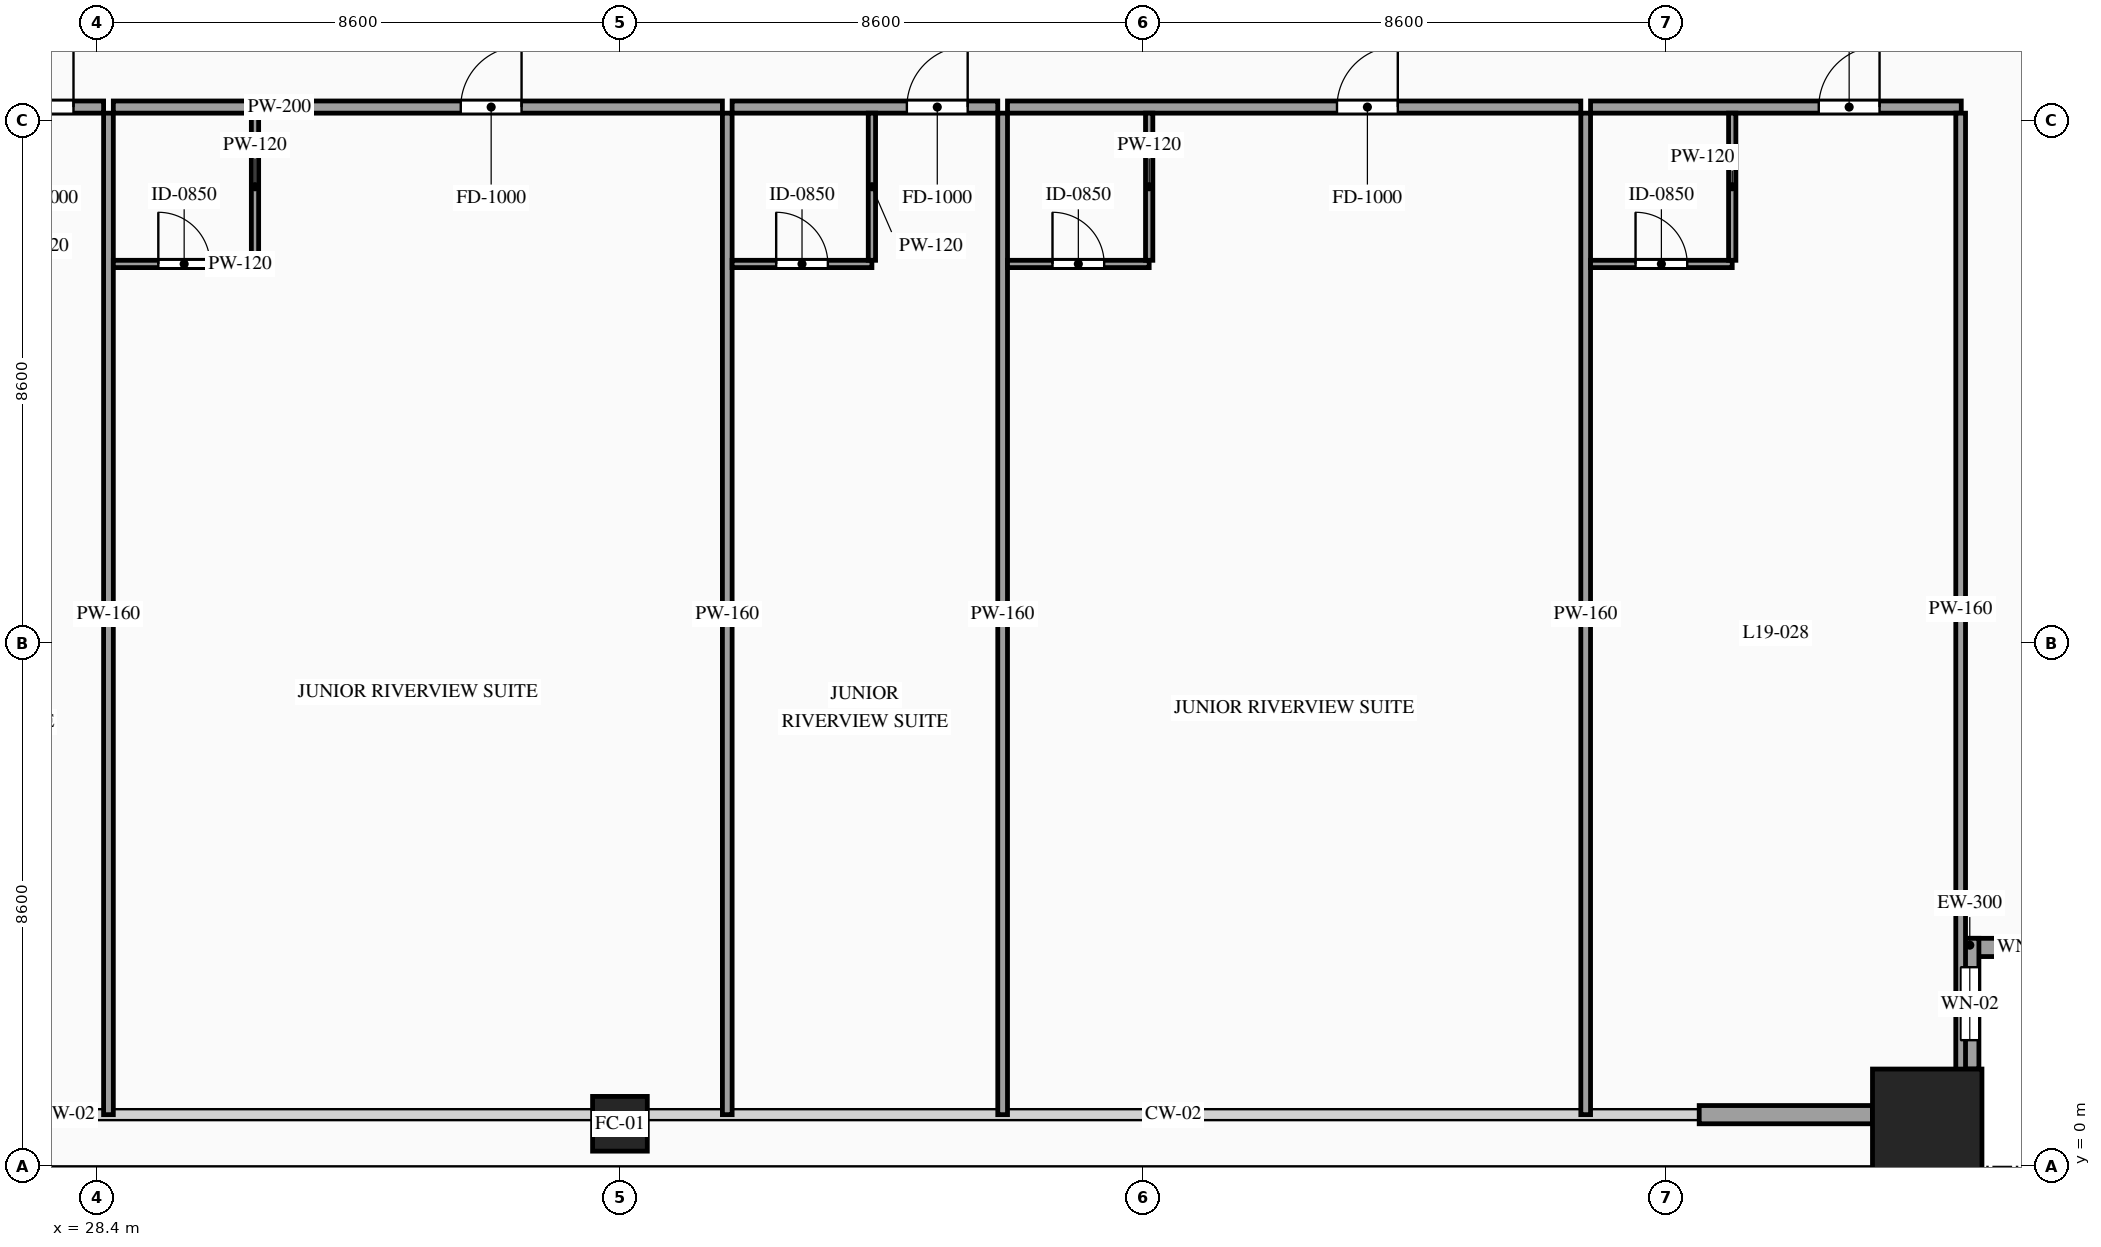
"""IFC4 building model, lengths in metres.
Left out: names, types, materials, properties, quantities, classifications, styles, units other than length and angle.
Written with IfcOpenShell. Run it as: python <this file> out.ifc"""

import sys

from ifc_helpers import new_model, si_unit, direction, frame, frame_2d, origin, origin_2d, place, context, subcontext, project, spatial, rectangle, hollow_rectangle, extrude, source, transform, mapped, element, fill, save


model = new_model("IFC4")
c1 = context("Model", 3, precision=1e-05, world=origin(), true_north=direction((0.0, 1.0)))
c2 = subcontext(c1, "Body", "Model", "MODEL_VIEW")
j1 = project(units=[si_unit("LENGTHUNIT", "METRE"), si_unit("PLANEANGLEUNIT", "RADIAN")], contexts=[c1])
p1 = place(None, origin())
s1 = spatial("IfcSite", under=j1, at=p1, CompositionType="ELEMENT")
p2 = place(p1, origin())
s2 = spatial("IfcBuilding", under=s1, at=p2, CompositionType="ELEMENT")
p3 = place(p2, frame((0.0, 0.0, 74.8)))
s3 = spatial("IfcBuildingStorey", under=s2, at=p3, CompositionType="ELEMENT", Elevation=74.8)
m1 = source(origin(), c2, "Body", "SweptSolid", [
    extrude(hollow_rectangle(XDim=0.9, YDim=0.9, WallThickness=0.042, at=origin_2d()), origin(), (0.0, 0.0, 1.0), 3.6),
])
p4 = place(p3, frame((37.0, 0.7, 0.0), z_axis=(0.0, 0.0, 1.0), x_axis=(1.0, 0.0, 0.0)))
e1 = element("IfcColumn", 1, at=p4, inside=s3, PredefinedType="COLUMN", context=c2, shape_type="MappedRepresentation", body=[
    mapped(m1, transform((0.0, 0.0, 0.0), scale=1.0)),
])
m2 = source(origin(), c2, "Body", "SweptSolid", [
    extrude(hollow_rectangle(XDim=1.8, YDim=1.8, WallThickness=0.08, at=origin_2d()), origin(), (0.0, 0.0, 1.0), 3.6),
])
p5 = place(p3, frame((58.5, 0.7, 0.0), z_axis=(0.0, 0.0, 1.0), x_axis=(1.0, 0.0, 0.0)))
e2 = element("IfcColumn", 2, at=p5, inside=s3, PredefinedType="COLUMN", context=c2, shape_type="MappedRepresentation", body=[
    mapped(m2, transform((0.0, 0.0, 0.0), scale=1.0)),
])
p6 = place(p3, frame((59.05, 3.6, 0.0), z_axis=(0.0, 0.0, 1.0), x_axis=(1.0, 0.0, 0.0)))
e3 = element("IfcWall", 3, at=p6, inside=s3, PredefinedType="SOLIDWALL", context=c2, shape_type="SweptSolid", body=[
    extrude(rectangle(XDim=2.15, YDim=0.3, at=frame_2d((1.075, 0.0))), origin(), (0.0, 0.0, 1.0), 3.38),
])
p7 = place(p6, frame((0.625, 0.0, 0.85)))
e4 = element("IfcOpeningElement", 4, at=p7, cuts=e3, PredefinedType="OPENING", context=c2, shape_type="SweptSolid", body=[
    extrude(rectangle(XDim=0.9, YDim=1.5, at=frame_2d((0.45, 0.75))), frame((0.0, 0.165, 0.0), z_axis=(0.0, -1.0, 0.0), x_axis=(1.0, 0.0, 0.0)), (0.0, 0.0, 1.0), 0.33),
])
p8 = place(p3, frame((59.2, 1.6, 0.0), z_axis=(0.0, 0.0, 1.0), x_axis=(0.0, 1.0, 0.0)))
e5 = element("IfcWall", 5, at=p8, inside=s3, PredefinedType="SOLIDWALL", context=c2, shape_type="SweptSolid", body=[
    extrude(rectangle(XDim=2.15, YDim=0.3, at=frame_2d((1.075, 0.0))), origin(), (0.0, 0.0, 1.0), 3.38),
])
p9 = place(p8, frame((0.475, 0.0, 0.85)))
e6 = element("IfcOpeningElement", 6, at=p9, cuts=e5, PredefinedType="OPENING", context=c2, shape_type="SweptSolid", body=[
    extrude(rectangle(XDim=1.2, YDim=2.1, at=frame_2d((0.6, 1.05))), frame((0.0, 0.165, 0.0), z_axis=(0.0, -1.0, 0.0), x_axis=(1.0, 0.0, 0.0)), (0.0, 0.0, 1.0), 0.33),
])
m3 = source(origin(), c2, "Body", "SweptSolid", [
    extrude(rectangle(XDim=2.85, YDim=0.3, at=frame_2d((1.425, 0.0))), origin(), (0.0, 0.0, 1.0), 2.775),
])
p10 = place(p3, frame((54.75, 0.85, 0.0), z_axis=(0.0, 0.0, 1.0), x_axis=(1.0, 0.0, 0.0)))
e7 = element("IfcWall", 7, at=p10, inside=s3, PredefinedType="SOLIDWALL", context=c2, shape_type="MappedRepresentation", body=[
    mapped(m3, transform((0.0, 0.0, 0.0), scale=1.0)),
])
p11 = place(p3, frame((24.138, 17.42, 0.0), z_axis=(0.0, 0.0, 1.0), x_axis=(1.0, 0.0, 0.0)))
e8 = element("IfcWall", 8, at=p11, inside=s3, PredefinedType="PARTITIONING", context=c2, shape_type="SweptSolid", body=[
    extrude(rectangle(XDim=4.37, YDim=0.2, at=frame_2d((2.185, 0.0))), origin(), (0.0, 0.0, 1.0), 3.38),
])
p12 = place(p11, frame((2.875, 0.0, 0.0)))
e9 = element("IfcOpeningElement", 9, at=p12, cuts=e8, PredefinedType="OPENING", context=c2, shape_type="SweptSolid", body=[
    extrude(rectangle(XDim=1.0, YDim=2.2, at=frame_2d((0.5, 1.1))), frame((0.0, 0.115, 0.0), z_axis=(0.0, -1.0, 0.0), x_axis=(1.0, 0.0, 0.0)), (0.0, 0.0, 1.0), 0.23),
])
m4 = source(origin(), c2, "Body", "SweptSolid", [
    extrude(rectangle(XDim=16.47, YDim=0.16, at=frame_2d((8.235, 0.0))), origin(), (0.0, 0.0, 1.0), 3.38),
])
p13 = place(p3, frame((28.588, 0.85, 0.0), z_axis=(0.0, 0.0, 1.0), x_axis=(0.0, 1.0, 0.0)))
e10 = element("IfcWall", 10, at=p13, inside=s3, PredefinedType="PARTITIONING", context=c2, shape_type="MappedRepresentation", body=[
    mapped(m4, transform((0.0, 0.0, 0.0), scale=1.0)),
])
p14 = place(p3, frame((28.668, 17.42, 0.0), z_axis=(0.0, 0.0, 1.0), x_axis=(1.0, 0.0, 0.0)))
e11 = element("IfcWall", 11, at=p14, inside=s3, PredefinedType="PARTITIONING", context=c2, shape_type="SweptSolid", body=[
    extrude(rectangle(XDim=10.017, YDim=0.2, at=frame_2d((5.009, 0.0))), origin(), (0.0, 0.0, 1.0), 3.38),
])
p15 = place(p14, frame((5.714, 0.0, 0.0)))
e12 = element("IfcOpeningElement", 12, at=p15, cuts=e11, PredefinedType="OPENING", context=c2, shape_type="SweptSolid", body=[
    extrude(rectangle(XDim=1.0, YDim=2.2, at=frame_2d((0.5, 1.1))), frame((0.0, 0.115, 0.0), z_axis=(0.0, -1.0, 0.0), x_axis=(1.0, 0.0, 0.0)), (0.0, 0.0, 1.0), 0.23),
])
p16 = place(p3, frame((38.765, 0.85, 0.0), z_axis=(0.0, 0.0, 1.0), x_axis=(0.0, 1.0, 0.0)))
e13 = element("IfcWall", 13, at=p16, inside=s3, PredefinedType="PARTITIONING", context=c2, shape_type="MappedRepresentation", body=[
    mapped(m4, transform((0.0, 0.0, 0.0), scale=1.0)),
])
p17 = place(p3, frame((28.668, 14.84, 0.0), z_axis=(0.0, 0.0, 1.0), x_axis=(1.0, 0.0, 0.0)))
e14 = element("IfcWall", 14, at=p17, inside=s3, PredefinedType="PARTITIONING", context=c2, shape_type="SweptSolid", body=[
    extrude(rectangle(XDim=2.33, YDim=0.12, at=frame_2d((1.165, 0.0))), origin(), (0.0, 0.0, 1.0), 3.38),
])
p18 = place(p17, frame((0.74, 0.0, 0.0)))
e15 = element("IfcOpeningElement", 15, at=p18, cuts=e14, PredefinedType="OPENING", context=c2, shape_type="SweptSolid", body=[
    extrude(rectangle(XDim=0.85, YDim=2.1, at=frame_2d((0.425, 1.05))), frame((0.0, 0.075, 0.0), z_axis=(0.0, -1.0, 0.0), x_axis=(1.0, 0.0, 0.0)), (0.0, 0.0, 1.0), 0.15),
])
m5 = source(origin(), c2, "Body", "SweptSolid", [
    extrude(rectangle(XDim=2.42, YDim=0.12, at=frame_2d((1.21, 0.0))), origin(), (0.0, 0.0, 1.0), 3.38),
])
p19 = place(p3, frame((30.998, 14.9, 0.0), z_axis=(0.0, 0.0, 1.0), x_axis=(0.0, 1.0, 0.0)))
e16 = element("IfcWall", 16, at=p19, inside=s3, PredefinedType="PARTITIONING", context=c2, shape_type="MappedRepresentation", body=[
    mapped(m5, transform((0.0, 0.0, 0.0), scale=1.0)),
])
p20 = place(p3, frame((38.845, 17.42, 0.0), z_axis=(0.0, 0.0, 1.0), x_axis=(1.0, 0.0, 0.0)))
e17 = element("IfcWall", 17, at=p20, inside=s3, PredefinedType="PARTITIONING", context=c2, shape_type="SweptSolid", body=[
    extrude(rectangle(XDim=4.369, YDim=0.2, at=frame_2d((2.185, 0.0))), origin(), (0.0, 0.0, 1.0), 3.38),
])
p21 = place(p20, frame((2.874, 0.0, 0.0)))
e18 = element("IfcOpeningElement", 18, at=p21, cuts=e17, PredefinedType="OPENING", context=c2, shape_type="SweptSolid", body=[
    extrude(rectangle(XDim=1.0, YDim=2.2, at=frame_2d((0.5, 1.1))), frame((0.0, 0.115, 0.0), z_axis=(0.0, -1.0, 0.0), x_axis=(1.0, 0.0, 0.0)), (0.0, 0.0, 1.0), 0.23),
])
p22 = place(p3, frame((43.294, 0.85, 0.0), z_axis=(0.0, 0.0, 1.0), x_axis=(0.0, 1.0, 0.0)))
e19 = element("IfcWall", 19, at=p22, inside=s3, PredefinedType="PARTITIONING", context=c2, shape_type="MappedRepresentation", body=[
    mapped(m4, transform((0.0, 0.0, 0.0), scale=1.0)),
])
p23 = place(p3, frame((38.845, 14.84, 0.0), z_axis=(0.0, 0.0, 1.0), x_axis=(1.0, 0.0, 0.0)))
e20 = element("IfcWall", 20, at=p23, inside=s3, PredefinedType="PARTITIONING", context=c2, shape_type="SweptSolid", body=[
    extrude(rectangle(XDim=2.299, YDim=0.12, at=frame_2d((1.149, 0.0))), origin(), (0.0, 0.0, 1.0), 3.38),
])
p24 = place(p23, frame((0.725, 0.0, 0.0)))
e21 = element("IfcOpeningElement", 21, at=p24, cuts=e20, PredefinedType="OPENING", context=c2, shape_type="SweptSolid", body=[
    extrude(rectangle(XDim=0.85, YDim=2.1, at=frame_2d((0.425, 1.05))), frame((0.0, 0.075, 0.0), z_axis=(0.0, -1.0, 0.0), x_axis=(1.0, 0.0, 0.0)), (0.0, 0.0, 1.0), 0.15),
])
p25 = place(p3, frame((41.144, 14.9, 0.0), z_axis=(0.0, 0.0, 1.0), x_axis=(0.0, 1.0, 0.0)))
e22 = element("IfcWall", 22, at=p25, inside=s3, PredefinedType="PARTITIONING", context=c2, shape_type="MappedRepresentation", body=[
    mapped(m5, transform((0.0, 0.0, 0.0), scale=1.0)),
])
p26 = place(p3, frame((43.374, 17.42, 0.0), z_axis=(0.0, 0.0, 1.0), x_axis=(1.0, 0.0, 0.0)))
e23 = element("IfcWall", 23, at=p26, inside=s3, PredefinedType="PARTITIONING", context=c2, shape_type="SweptSolid", body=[
    extrude(rectangle(XDim=9.429, YDim=0.2, at=frame_2d((4.714, 0.0))), origin(), (0.0, 0.0, 1.0), 3.38),
])
p27 = place(p26, frame((5.419, 0.0, 0.0)))
e24 = element("IfcOpeningElement", 24, at=p27, cuts=e23, PredefinedType="OPENING", context=c2, shape_type="SweptSolid", body=[
    extrude(rectangle(XDim=1.0, YDim=2.2, at=frame_2d((0.5, 1.1))), frame((0.0, 0.115, 0.0), z_axis=(0.0, -1.0, 0.0), x_axis=(1.0, 0.0, 0.0)), (0.0, 0.0, 1.0), 0.23),
])
p28 = place(p3, frame((52.883, 0.85, 0.0), z_axis=(0.0, 0.0, 1.0), x_axis=(0.0, 1.0, 0.0)))
e25 = element("IfcWall", 25, at=p28, inside=s3, PredefinedType="PARTITIONING", context=c2, shape_type="MappedRepresentation", body=[
    mapped(m4, transform((0.0, 0.0, 0.0), scale=1.0)),
])
p29 = place(p3, frame((43.374, 14.84, 0.0), z_axis=(0.0, 0.0, 1.0), x_axis=(1.0, 0.0, 0.0)))
e26 = element("IfcWall", 26, at=p29, inside=s3, PredefinedType="PARTITIONING", context=c2, shape_type="SweptSolid", body=[
    extrude(rectangle(XDim=2.33, YDim=0.12, at=frame_2d((1.165, 0.0))), origin(), (0.0, 0.0, 1.0), 3.38),
])
p30 = place(p29, frame((0.74, 0.0, 0.0)))
e27 = element("IfcOpeningElement", 27, at=p30, cuts=e26, PredefinedType="OPENING", context=c2, shape_type="SweptSolid", body=[
    extrude(rectangle(XDim=0.85, YDim=2.1, at=frame_2d((0.425, 1.05))), frame((0.0, 0.075, 0.0), z_axis=(0.0, -1.0, 0.0), x_axis=(1.0, 0.0, 0.0)), (0.0, 0.0, 1.0), 0.15),
])
p31 = place(p3, frame((45.704, 14.9, 0.0), z_axis=(0.0, 0.0, 1.0), x_axis=(0.0, 1.0, 0.0)))
e28 = element("IfcWall", 28, at=p31, inside=s3, PredefinedType="PARTITIONING", context=c2, shape_type="MappedRepresentation", body=[
    mapped(m5, transform((0.0, 0.0, 0.0), scale=1.0)),
])
p32 = place(p3, frame((52.963, 17.42, 0.0), z_axis=(0.0, 0.0, 1.0), x_axis=(1.0, 0.0, 0.0)))
e29 = element("IfcWall", 29, at=p32, inside=s3, PredefinedType="PARTITIONING", context=c2, shape_type="SweptSolid", body=[
    extrude(rectangle(XDim=6.097, YDim=0.2, at=frame_2d((3.049, 0.0))), origin(), (0.0, 0.0, 1.0), 3.38),
])
p33 = place(p32, frame((3.753, 0.0, 0.0)))
e30 = element("IfcOpeningElement", 30, at=p33, cuts=e29, PredefinedType="OPENING", context=c2, shape_type="SweptSolid", body=[
    extrude(rectangle(XDim=1.0, YDim=2.2, at=frame_2d((0.5, 1.1))), frame((0.0, 0.115, 0.0), z_axis=(0.0, -1.0, 0.0), x_axis=(1.0, 0.0, 0.0)), (0.0, 0.0, 1.0), 0.23),
])
m6 = source(origin(), c2, "Body", "SweptSolid", [
    extrude(rectangle(XDim=16.32, YDim=0.16, at=frame_2d((8.16, 0.0))), origin(), (0.0, 0.0, 1.0), 3.38),
])
p34 = place(p3, frame((59.05, 1.0, 0.0), z_axis=(0.0, 0.0, 1.0), x_axis=(0.0, 1.0, 0.0)))
e31 = element("IfcWall", 31, at=p34, inside=s3, PredefinedType="PARTITIONING", context=c2, shape_type="MappedRepresentation", body=[
    mapped(m6, transform((0.0, 0.0, 0.0), scale=1.0)),
])
p35 = place(p3, frame((52.963, 14.84, 0.0), z_axis=(0.0, 0.0, 1.0), x_axis=(1.0, 0.0, 0.0)))
e32 = element("IfcWall", 32, at=p35, inside=s3, PredefinedType="PARTITIONING", context=c2, shape_type="SweptSolid", body=[
    extrude(rectangle(XDim=2.33, YDim=0.12, at=frame_2d((1.165, 0.0))), origin(), (0.0, 0.0, 1.0), 3.38),
])
p36 = place(p35, frame((0.74, 0.0, 0.0)))
e33 = element("IfcOpeningElement", 33, at=p36, cuts=e32, PredefinedType="OPENING", context=c2, shape_type="SweptSolid", body=[
    extrude(rectangle(XDim=0.85, YDim=2.1, at=frame_2d((0.425, 1.05))), frame((0.0, 0.075, 0.0), z_axis=(0.0, -1.0, 0.0), x_axis=(1.0, 0.0, 0.0)), (0.0, 0.0, 1.0), 0.15),
])
p37 = place(p3, frame((55.293, 14.9, 0.0), z_axis=(0.0, 0.0, 1.0), x_axis=(0.0, 1.0, 0.0)))
e34 = element("IfcWall", 34, at=p37, inside=s3, PredefinedType="PARTITIONING", context=c2, shape_type="MappedRepresentation", body=[
    mapped(m5, transform((0.0, 0.0, 0.0), scale=1.0)),
])
m7 = source(origin(), c2, "Body", "SweptSolid", [
    extrude(rectangle(XDim=0.9, YDim=1.5, at=frame_2d((0.45, 0.75))), frame((0.0, 0.03, 0.0), z_axis=(0.0, -1.0, 0.0), x_axis=(1.0, 0.0, 0.0)), (0.0, 0.0, 1.0), 0.06),
])
p38 = place(p7, origin())
e35 = element("IfcWindow", 35, at=p38, inside=s3, PartitioningType="SINGLE_PANEL", PredefinedType="WINDOW", context=c2, shape_type="MappedRepresentation", body=[
    mapped(m7, transform((0.0, 0.0, 0.0), scale=1.0)),
])
fill(e4, e35)
m8 = source(origin(), c2, "Body", "SweptSolid", [
    extrude(rectangle(XDim=1.2, YDim=2.1, at=frame_2d((0.6, 1.05))), frame((0.0, 0.03, 0.0), z_axis=(0.0, -1.0, 0.0), x_axis=(1.0, 0.0, 0.0)), (0.0, 0.0, 1.0), 0.06),
])
p39 = place(p9, origin())
e36 = element("IfcWindow", 36, at=p39, inside=s3, PartitioningType="SINGLE_PANEL", PredefinedType="WINDOW", context=c2, shape_type="MappedRepresentation", body=[
    mapped(m8, transform((0.0, 0.0, 0.0), scale=1.0)),
])
fill(e6, e36)
m9 = source(origin(), c2, "Body", "SweptSolid", [
    extrude(rectangle(XDim=1.0, YDim=2.2, at=frame_2d((0.5, 1.1))), frame((0.0, 0.025, 0.0), z_axis=(0.0, -1.0, 0.0), x_axis=(1.0, 0.0, 0.0)), (0.0, 0.0, 1.0), 0.05),
])
p40 = place(p12, origin())
e37 = element("IfcDoor", 37, at=p40, inside=s3, OperationType="SINGLE_SWING_RIGHT", PredefinedType="DOOR", context=c2, shape_type="MappedRepresentation", body=[
    mapped(m9, transform((0.0, 0.0, 0.0), scale=1.0)),
])
fill(e9, e37)
p41 = place(p15, origin())
e38 = element("IfcDoor", 38, at=p41, inside=s3, OperationType="SINGLE_SWING_RIGHT", PredefinedType="DOOR", context=c2, shape_type="MappedRepresentation", body=[
    mapped(m9, transform((0.0, 0.0, 0.0), scale=1.0)),
])
fill(e12, e38)
m10 = source(origin(), c2, "Body", "SweptSolid", [
    extrude(rectangle(XDim=0.85, YDim=2.1, at=frame_2d((0.425, 1.05))), frame((0.0, 0.025, 0.0), z_axis=(0.0, -1.0, 0.0), x_axis=(1.0, 0.0, 0.0)), (0.0, 0.0, 1.0), 0.05),
])
p42 = place(p18, origin())
e39 = element("IfcDoor", 39, at=p42, inside=s3, OperationType="SINGLE_SWING_LEFT", PredefinedType="DOOR", context=c2, shape_type="MappedRepresentation", body=[
    mapped(m10, transform((0.0, 0.0, 0.0), scale=1.0)),
])
fill(e15, e39)
p43 = place(p21, origin())
e40 = element("IfcDoor", 40, at=p43, inside=s3, OperationType="SINGLE_SWING_RIGHT", PredefinedType="DOOR", context=c2, shape_type="MappedRepresentation", body=[
    mapped(m9, transform((0.0, 0.0, 0.0), scale=1.0)),
])
fill(e18, e40)
p44 = place(p24, origin())
e41 = element("IfcDoor", 41, at=p44, inside=s3, OperationType="SINGLE_SWING_LEFT", PredefinedType="DOOR", context=c2, shape_type="MappedRepresentation", body=[
    mapped(m10, transform((0.0, 0.0, 0.0), scale=1.0)),
])
fill(e21, e41)
p45 = place(p27, origin())
e42 = element("IfcDoor", 42, at=p45, inside=s3, OperationType="SINGLE_SWING_RIGHT", PredefinedType="DOOR", context=c2, shape_type="MappedRepresentation", body=[
    mapped(m9, transform((0.0, 0.0, 0.0), scale=1.0)),
])
fill(e24, e42)
p46 = place(p30, origin())
e43 = element("IfcDoor", 43, at=p46, inside=s3, OperationType="SINGLE_SWING_LEFT", PredefinedType="DOOR", context=c2, shape_type="MappedRepresentation", body=[
    mapped(m10, transform((0.0, 0.0, 0.0), scale=1.0)),
])
fill(e27, e43)
p47 = place(p33, origin())
e44 = element("IfcDoor", 44, at=p47, inside=s3, OperationType="SINGLE_SWING_RIGHT", PredefinedType="DOOR", context=c2, shape_type="MappedRepresentation", body=[
    mapped(m9, transform((0.0, 0.0, 0.0), scale=1.0)),
])
fill(e30, e44)
p48 = place(p36, origin())
e45 = element("IfcDoor", 45, at=p48, inside=s3, OperationType="SINGLE_SWING_LEFT", PredefinedType="DOOR", context=c2, shape_type="MappedRepresentation", body=[
    mapped(m10, transform((0.0, 0.0, 0.0), scale=1.0)),
])
fill(e33, e45)
save(model, sys.argv[1])
